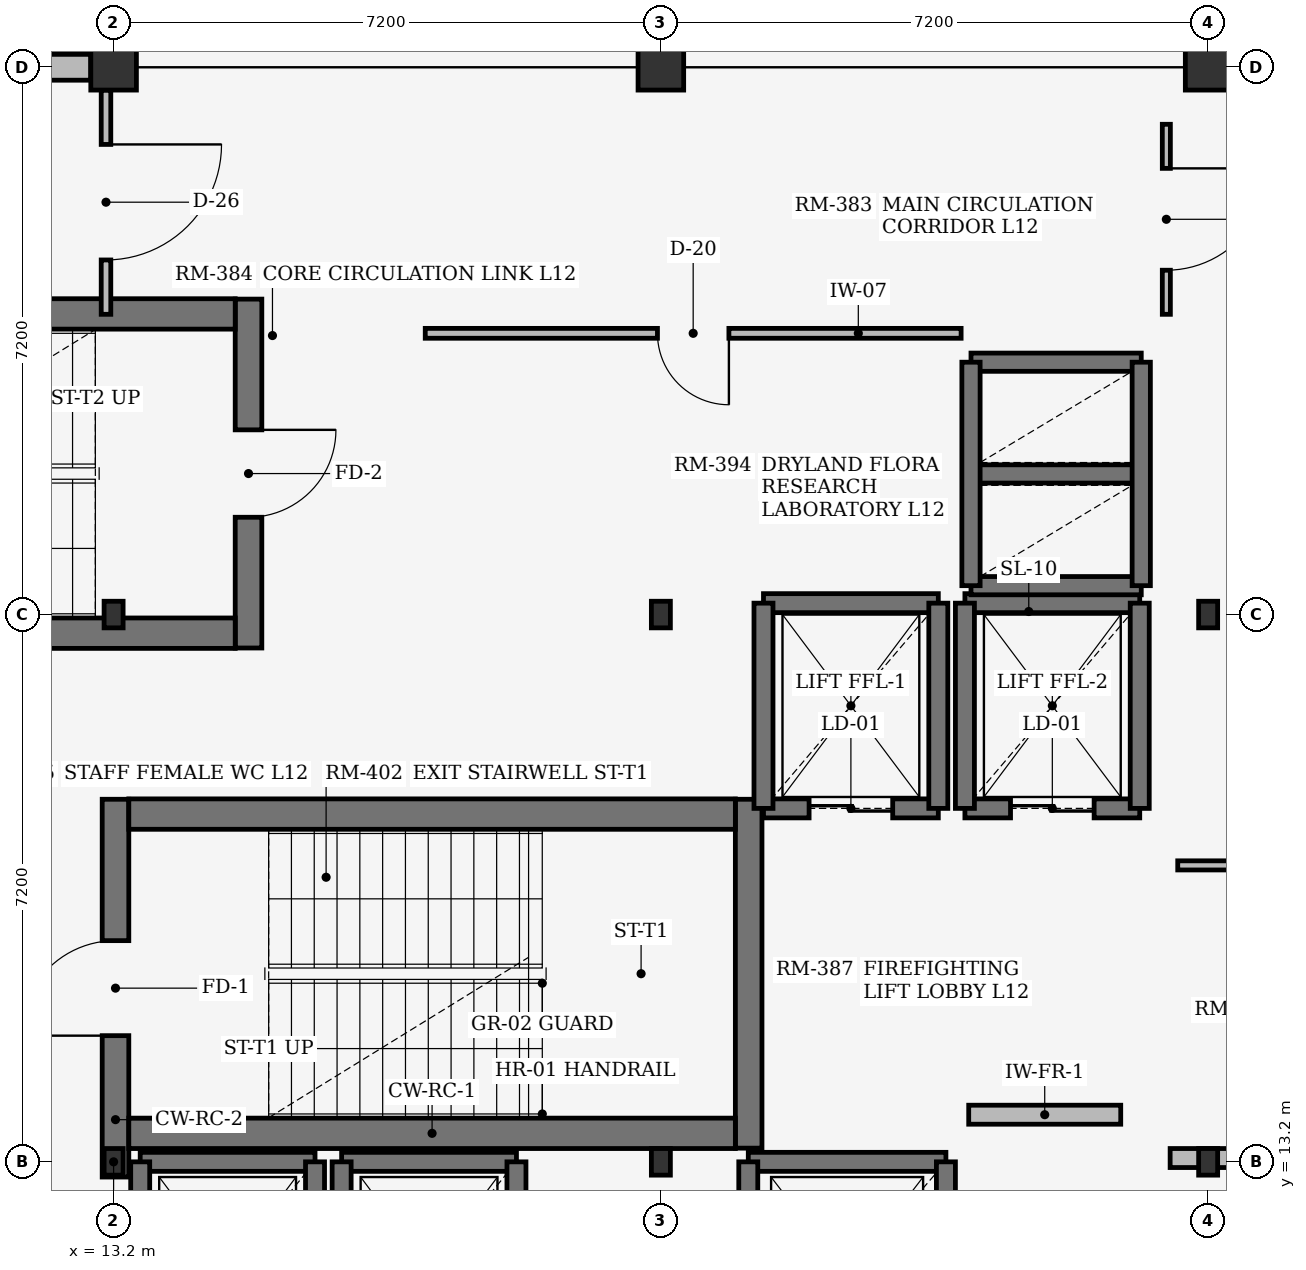
"""IFC4 building model, lengths in metres.
Left out: names, types, materials, properties, quantities, classifications, styles, units other than length and angle.
Written with IfcOpenShell. Run it as: python <this file> out.ifc"""

import sys

from ifc_helpers import new_model, si_unit, direction, frame, frame_2d, origin, origin_2d, place, context, subcontext, project, spatial, rectangle, i_section, extrude, element, fill, save


model = new_model("IFC4")
c1 = context("Model", 3, precision=1e-05, world=origin(), true_north=direction((0.0, 1.0)))
c2 = subcontext(c1, "Body", "Model", "MODEL_VIEW")
j1 = project(units=[si_unit("LENGTHUNIT", "METRE"), si_unit("PLANEANGLEUNIT", "RADIAN")], contexts=[c1])
p1 = place(None, origin())
s1 = spatial("IfcSite", under=j1, at=p1, CompositionType="ELEMENT")
p2 = place(p1, origin())
s2 = spatial("IfcBuilding", under=s1, at=p2, CompositionType="ELEMENT")
p3 = place(p2, frame((0.0, 0.0, 48.3)))
s3 = spatial("IfcBuildingStorey", under=s2, at=p3, CompositionType="ELEMENT", Elevation=48.3)
for number, where, z_axis, x_axis in (
    (1, (13.2, 13.2, 0.0), (0.0, 0.0, 1.0), (1.0, 0.0, 0.0)),
    (2, (13.2, 20.4, 0.0), (0.0, 0.0, 1.0), (1.0, 0.0, 0.0)),
):
    element("IfcColumn", number, at=place(p3, frame(where, z_axis=z_axis, x_axis=x_axis)), inside=s3, PredefinedType="COLUMN", context=c2, shape_type="SweptSolid", body=[
        extrude(i_section(OverallWidth=0.25, OverallDepth=0.35, WebThickness=0.01, FlangeThickness=0.012, at=origin_2d()), origin(), (0.0, 0.0, 1.0), 3.68),
    ])
p4 = place(p3, frame((13.2, 27.6, 0.0), z_axis=(0.0, 0.0, 1.0), x_axis=(1.0, 0.0, 0.0)))
e3 = element("IfcColumn", 3, at=p4, inside=s3, PredefinedType="COLUMN", context=c2, shape_type="SweptSolid", body=[
    extrude(rectangle(XDim=0.6, YDim=0.6, at=origin_2d()), origin(), (0.0, 0.0, 1.0), 3.68),
])
for number, where, z_axis, x_axis in (
    (4, (20.4, 13.2, 0.0), (0.0, 0.0, 1.0), (1.0, 0.0, 0.0)),
    (5, (20.4, 20.4, 0.0), (0.0, 0.0, 1.0), (1.0, 0.0, 0.0)),
):
    element("IfcColumn", number, at=place(p3, frame(where, z_axis=z_axis, x_axis=x_axis)), inside=s3, PredefinedType="COLUMN", context=c2, shape_type="SweptSolid", body=[
        extrude(i_section(OverallWidth=0.25, OverallDepth=0.35, WebThickness=0.01, FlangeThickness=0.012, at=origin_2d()), origin(), (0.0, 0.0, 1.0), 3.68),
    ])
p5 = place(p3, frame((20.4, 27.6, 0.0), z_axis=(0.0, 0.0, 1.0), x_axis=(1.0, 0.0, 0.0)))
e6 = element("IfcColumn", 6, at=p5, inside=s3, PredefinedType="COLUMN", context=c2, shape_type="SweptSolid", body=[
    extrude(rectangle(XDim=0.6, YDim=0.6, at=origin_2d()), origin(), (0.0, 0.0, 1.0), 3.68),
])
for number, where, z_axis, x_axis in (
    (7, (27.6, 13.2, 0.0), (0.0, 0.0, 1.0), (1.0, 0.0, 0.0)),
    (8, (27.6, 20.4, 0.0), (0.0, 0.0, 1.0), (1.0, 0.0, 0.0)),
):
    element("IfcColumn", number, at=place(p3, frame(where, z_axis=z_axis, x_axis=x_axis)), inside=s3, PredefinedType="COLUMN", context=c2, shape_type="SweptSolid", body=[
        extrude(i_section(OverallWidth=0.25, OverallDepth=0.35, WebThickness=0.01, FlangeThickness=0.012, at=origin_2d()), origin(), (0.0, 0.0, 1.0), 3.68),
    ])
p6 = place(p3, frame((27.6, 27.6, 0.0), z_axis=(0.0, 0.0, 1.0), x_axis=(1.0, 0.0, 0.0)))
e9 = element("IfcColumn", 9, at=p6, inside=s3, PredefinedType="COLUMN", context=c2, shape_type="SweptSolid", body=[
    extrude(rectangle(XDim=0.6, YDim=0.6, at=origin_2d()), origin(), (0.0, 0.0, 1.0), 3.68),
])
p7 = place(p3, frame((6.3, 27.6, 0.0), z_axis=(0.0, 0.0, 1.0), x_axis=(1.0, 0.0, 0.0)))
e10 = element("IfcWall", 10, at=p7, inside=s3, PredefinedType="STANDARD", context=c2, shape_type="SweptSolid", body=[
    extrude(rectangle(XDim=6.6, YDim=0.34, at=frame_2d((3.3, 0.0))), origin(), (0.0, 0.0, 1.0), 3.26),
])
p8 = place(p7, frame((2.45, 0.0, 0.75)))
e11 = element("IfcOpeningElement", 11, at=p8, cuts=e10, PredefinedType="OPENING", context=c2, shape_type="SweptSolid", body=[
    extrude(rectangle(XDim=1.7, YDim=1.35, at=frame_2d((0.85, 0.675))), frame((0.0, 0.18, 0.0), z_axis=(0.0, -1.0, 0.0), x_axis=(1.0, 0.0, 0.0)), (0.0, 0.0, 1.0), 0.36),
])
p9 = place(p3, frame((13.225, 13.0, 0.0), z_axis=(0.0, 0.0, 1.0), x_axis=(0.0, 1.0, 0.0)))
e12 = element("IfcWall", 12, at=p9, inside=s3, PredefinedType="SHEAR", context=c2, shape_type="SweptSolid", body=[
    extrude(rectangle(XDim=4.97, YDim=0.35, at=frame_2d((2.485, 0.0))), origin(), (0.0, 0.0, 1.0), 3.68),
])
p10 = place(p9, frame((1.86, 0.0, 0.0)))
e13 = element("IfcOpeningElement", 13, at=p10, cuts=e12, PredefinedType="OPENING", context=c2, shape_type="SweptSolid", body=[
    extrude(rectangle(XDim=1.25, YDim=2.2, at=frame_2d((0.625, 1.1))), frame((0.0, 0.185, 0.0), z_axis=(0.0, -1.0, 0.0), x_axis=(1.0, 0.0, 0.0)), (0.0, 0.0, 1.0), 0.37),
])
p11 = place(p3, frame((21.555, 13.38, 0.0), z_axis=(0.0, 0.0, 1.0), x_axis=(0.0, 1.0, 0.0)))
e14 = element("IfcWall", 14, at=p11, inside=s3, PredefinedType="SHEAR", context=c2, shape_type="SweptSolid", body=[
    extrude(rectangle(XDim=4.59, YDim=0.35, at=frame_2d((2.295, 0.0))), origin(), (0.0, 0.0, 1.0), 3.68),
])
for number, where, z_axis, x_axis in (
    (15, (13.4, 13.575, 0.0), (0.0, 0.0, 1.0), (1.0, 0.0, 0.0)),
    (16, (13.4, 17.775, 0.0), (0.0, 0.0, 1.0), (1.0, 0.0, 0.0)),
):
    element("IfcWall", number, at=place(p3, frame(where, z_axis=z_axis, x_axis=x_axis)), inside=s3, PredefinedType="SHEAR", context=c2, shape_type="SweptSolid", body=[
        extrude(rectangle(XDim=7.98, YDim=0.4, at=frame_2d((3.99, 0.0))), origin(), (0.0, 0.0, 1.0), 3.68),
    ])
p12 = place(p3, frame((14.975, 24.55, 0.0), z_axis=(0.0, 0.0, 1.0), x_axis=(0.0, -1.0, 0.0)))
e17 = element("IfcWall", 17, at=p12, inside=s3, PredefinedType="SHEAR", context=c2, shape_type="SweptSolid", body=[
    extrude(rectangle(XDim=4.59, YDim=0.35, at=frame_2d((2.295, 0.0))), origin(), (0.0, 0.0, 1.0), 3.68),
])
p13 = place(p12, frame((1.72, 0.0, 0.0)))
e18 = element("IfcOpeningElement", 18, at=p13, cuts=e17, PredefinedType="OPENING", context=c2, shape_type="SweptSolid", body=[
    extrude(rectangle(XDim=1.15, YDim=2.2, at=frame_2d((0.575, 1.1))), frame((0.0, 0.185, 0.0), z_axis=(0.0, -1.0, 0.0), x_axis=(1.0, 0.0, 0.0)), (0.0, 0.0, 1.0), 0.37),
])
for number, where, z_axis, x_axis in (
    (19, (14.8, 24.355, 0.0), (0.0, 0.0, 1.0), (-1.0, 0.0, 0.0)),
    (20, (14.8, 20.155, 0.0), (0.0, 0.0, 1.0), (-1.0, 0.0, 0.0)),
):
    element("IfcWall", number, at=place(p3, frame(where, z_axis=z_axis, x_axis=x_axis)), inside=s3, PredefinedType="SHEAR", context=c2, shape_type="SweptSolid", body=[
        extrude(rectangle(XDim=7.98, YDim=0.4, at=frame_2d((3.99, 0.0))), origin(), (0.0, 0.0, 1.0), 3.68),
    ])
p14 = place(p3, frame((21.75, 17.85, 0.0), z_axis=(0.0, 0.0, 1.0), x_axis=(1.0, 0.0, 0.0)))
e21 = element("IfcWall", 21, at=p14, inside=s3, PredefinedType="SHEAR", context=c2, shape_type="SweptSolid", body=[
    extrude(rectangle(XDim=2.3, YDim=0.25, at=frame_2d((1.15, 0.0))), origin(), (0.0, 0.0, 1.0), 3.68),
])
p15 = place(p14, frame((0.6, 0.0, 0.0)))
e22 = element("IfcOpeningElement", 22, at=p15, cuts=e21, PredefinedType="OPENING", context=c2, shape_type="SweptSolid", body=[
    extrude(rectangle(XDim=1.1, YDim=2.2, at=frame_2d((0.55, 1.1))), frame((0.0, 0.135, 0.0), z_axis=(0.0, -1.0, 0.0), x_axis=(1.0, 0.0, 0.0)), (0.0, 0.0, 1.0), 0.27),
])
p16 = place(p3, frame((21.75, 20.55, 0.0), z_axis=(0.0, 0.0, 1.0), x_axis=(1.0, 0.0, 0.0)))
e23 = element("IfcWall", 23, at=p16, inside=s3, PredefinedType="SHEAR", context=c2, shape_type="SweptSolid", body=[
    extrude(rectangle(XDim=2.3, YDim=0.25, at=frame_2d((1.15, 0.0))), origin(), (0.0, 0.0, 1.0), 3.68),
])
for number, where, z_axis, x_axis in (
    (24, (21.75, 17.85, 0.0), (0.0, 0.0, 1.0), (0.0, 1.0, 0.0)),
    (25, (24.05, 17.85, 0.0), (0.0, 0.0, 1.0), (0.0, 1.0, 0.0)),
):
    element("IfcWall", number, at=place(p3, frame(where, z_axis=z_axis, x_axis=x_axis)), inside=s3, PredefinedType="SHEAR", context=c2, shape_type="SweptSolid", body=[
        extrude(rectangle(XDim=2.7, YDim=0.25, at=frame_2d((1.35, 0.0))), origin(), (0.0, 0.0, 1.0), 3.68),
    ])
p17 = place(p3, frame((24.4, 17.85, 0.0), z_axis=(0.0, 0.0, 1.0), x_axis=(1.0, 0.0, 0.0)))
e26 = element("IfcWall", 26, at=p17, inside=s3, PredefinedType="SHEAR", context=c2, shape_type="SweptSolid", body=[
    extrude(rectangle(XDim=2.3, YDim=0.25, at=frame_2d((1.15, 0.0))), origin(), (0.0, 0.0, 1.0), 3.68),
])
p18 = place(p17, frame((0.6, 0.0, 0.0)))
e27 = element("IfcOpeningElement", 27, at=p18, cuts=e26, PredefinedType="OPENING", context=c2, shape_type="SweptSolid", body=[
    extrude(rectangle(XDim=1.1, YDim=2.2, at=frame_2d((0.55, 1.1))), frame((0.0, 0.135, 0.0), z_axis=(0.0, -1.0, 0.0), x_axis=(1.0, 0.0, 0.0)), (0.0, 0.0, 1.0), 0.27),
])
p19 = place(p3, frame((24.4, 20.55, 0.0), z_axis=(0.0, 0.0, 1.0), x_axis=(1.0, 0.0, 0.0)))
e28 = element("IfcWall", 28, at=p19, inside=s3, PredefinedType="SHEAR", context=c2, shape_type="SweptSolid", body=[
    extrude(rectangle(XDim=2.3, YDim=0.25, at=frame_2d((1.15, 0.0))), origin(), (0.0, 0.0, 1.0), 3.68),
])
for number, where, z_axis, x_axis in (
    (29, (24.4, 17.85, 0.0), (0.0, 0.0, 1.0), (0.0, 1.0, 0.0)),
    (30, (26.7, 17.85, 0.0), (0.0, 0.0, 1.0), (0.0, 1.0, 0.0)),
):
    element("IfcWall", number, at=place(p3, frame(where, z_axis=z_axis, x_axis=x_axis)), inside=s3, PredefinedType="SHEAR", context=c2, shape_type="SweptSolid", body=[
        extrude(rectangle(XDim=2.7, YDim=0.25, at=frame_2d((1.35, 0.0))), origin(), (0.0, 0.0, 1.0), 3.68),
    ])
p20 = place(p3, frame((13.55, 13.2, 0.0), z_axis=(0.0, 0.0, 1.0), x_axis=(1.0, 0.0, 0.0)))
e31 = element("IfcWall", 31, at=p20, inside=s3, PredefinedType="SHEAR", context=c2, shape_type="SweptSolid", body=[
    extrude(rectangle(XDim=2.3, YDim=0.25, at=frame_2d((1.15, 0.0))), origin(), (0.0, 0.0, 1.0), 3.68),
])
for number, where, z_axis, x_axis in (
    (32, (13.55, 10.4, 0.0), (0.0, 0.0, 1.0), (0.0, 1.0, 0.0)),
    (33, (15.85, 10.4, 0.0), (0.0, 0.0, 1.0), (0.0, 1.0, 0.0)),
):
    element("IfcWall", number, at=place(p3, frame(where, z_axis=z_axis, x_axis=x_axis)), inside=s3, PredefinedType="SHEAR", context=c2, shape_type="SweptSolid", body=[
        extrude(rectangle(XDim=2.8, YDim=0.25, at=frame_2d((1.4, 0.0))), origin(), (0.0, 0.0, 1.0), 3.68),
    ])
p21 = place(p3, frame((16.2, 13.2, 0.0), z_axis=(0.0, 0.0, 1.0), x_axis=(1.0, 0.0, 0.0)))
e34 = element("IfcWall", 34, at=p21, inside=s3, PredefinedType="SHEAR", context=c2, shape_type="SweptSolid", body=[
    extrude(rectangle(XDim=2.3, YDim=0.25, at=frame_2d((1.15, 0.0))), origin(), (0.0, 0.0, 1.0), 3.68),
])
for number, where, z_axis, x_axis in (
    (35, (16.2, 10.4, 0.0), (0.0, 0.0, 1.0), (0.0, 1.0, 0.0)),
    (36, (18.5, 10.4, 0.0), (0.0, 0.0, 1.0), (0.0, 1.0, 0.0)),
):
    element("IfcWall", number, at=place(p3, frame(where, z_axis=z_axis, x_axis=x_axis)), inside=s3, PredefinedType="SHEAR", context=c2, shape_type="SweptSolid", body=[
        extrude(rectangle(XDim=2.8, YDim=0.25, at=frame_2d((1.4, 0.0))), origin(), (0.0, 0.0, 1.0), 3.68),
    ])
p22 = place(p3, frame((21.55, 13.2, 0.0), z_axis=(0.0, 0.0, 1.0), x_axis=(1.0, 0.0, 0.0)))
e37 = element("IfcWall", 37, at=p22, inside=s3, PredefinedType="SHEAR", context=c2, shape_type="SweptSolid", body=[
    extrude(rectangle(XDim=2.6, YDim=0.25, at=frame_2d((1.3, 0.0))), origin(), (0.0, 0.0, 1.0), 3.68),
])
for number, where, z_axis, x_axis in (
    (38, (21.55, 10.2, 0.0), (0.0, 0.0, 1.0), (0.0, 1.0, 0.0)),
    (39, (24.15, 10.2, 0.0), (0.0, 0.0, 1.0), (0.0, 1.0, 0.0)),
):
    element("IfcWall", number, at=place(p3, frame(where, z_axis=z_axis, x_axis=x_axis)), inside=s3, PredefinedType="SHEAR", context=c2, shape_type="SweptSolid", body=[
        extrude(rectangle(XDim=3.0, YDim=0.25, at=frame_2d((1.5, 0.0))), origin(), (0.0, 0.0, 1.0), 3.68),
    ])
for number, where, z_axis, x_axis in (
    (40, (24.48, 20.78, 0.0), (0.0, 0.0, 1.0), (1.0, 0.0, 0.0)),
    (41, (24.48, 22.25, 0.0), (0.0, 0.0, 1.0), (1.0, 0.0, 0.0)),
    (42, (24.48, 23.72, 0.0), (0.0, 0.0, 1.0), (1.0, 0.0, 0.0)),
):
    element("IfcWall", number, at=place(p3, frame(where, z_axis=z_axis, x_axis=x_axis)), inside=s3, PredefinedType="SHEAR", context=c2, shape_type="SweptSolid", body=[
        extrude(rectangle(XDim=2.24, YDim=0.24, at=frame_2d((1.12, 0.0))), origin(), (0.0, 0.0, 1.0), 3.68),
    ])
for number, where, z_axis, x_axis in (
    (43, (24.48, 20.78, 0.0), (0.0, 0.0, 1.0), (0.0, 1.0, 0.0)),
    (44, (26.72, 20.78, 0.0), (0.0, 0.0, 1.0), (0.0, 1.0, 0.0)),
):
    element("IfcWall", number, at=place(p3, frame(where, z_axis=z_axis, x_axis=x_axis)), inside=s3, PredefinedType="SHEAR", context=c2, shape_type="SweptSolid", body=[
        extrude(rectangle(XDim=2.94, YDim=0.24, at=frame_2d((1.47, 0.0))), origin(), (0.0, 0.0, 1.0), 3.68),
    ])
p23 = place(p3, frame((24.45, 13.82, 0.0), z_axis=(0.0, 0.0, 1.0), x_axis=(1.0, 0.0, 0.0)))
e45 = element("IfcWall", 45, at=p23, inside=s3, PredefinedType="SOLIDWALL", context=c2, shape_type="SweptSolid", body=[
    extrude(rectangle(XDim=2.0, YDim=0.25, at=frame_2d((1.0, 0.0))), origin(), (0.0, 0.0, 1.0), 3.66),
])
p24 = place(p3, frame((17.3, 24.1, 0.0), z_axis=(0.0, 0.0, 1.0), x_axis=(1.0, 0.0, 0.0)))
e46 = element("IfcWall", 46, at=p24, inside=s3, PredefinedType="PARTITIONING", context=c2, shape_type="SweptSolid", body=[
    extrude(rectangle(XDim=7.05, YDim=0.13, at=frame_2d((3.525, 0.0))), origin(), (0.0, 0.0, 1.0), 3.66),
])
p25 = place(p24, frame((3.055, 0.0, 0.0)))
e47 = element("IfcOpeningElement", 47, at=p25, cuts=e46, PredefinedType="OPENING", context=c2, shape_type="SweptSolid", body=[
    extrude(rectangle(XDim=0.94, YDim=2.18, at=frame_2d((0.47, 1.09))), frame((0.0, 0.075, 0.0), z_axis=(0.0, -1.0, 0.0), x_axis=(1.0, 0.0, 0.0)), (0.0, 0.0, 1.0), 0.15),
])
p26 = place(p3, frame((27.2, 17.1, 0.0), z_axis=(0.0, 0.0, 1.0), x_axis=(1.0, 0.0, 0.0)))
e48 = element("IfcWall", 48, at=p26, inside=s3, PredefinedType="PARTITIONING", context=c2, shape_type="SweptSolid", body=[
    extrude(rectangle(XDim=7.05, YDim=0.12, at=frame_2d((3.525, 0.0))), origin(), (0.0, 0.0, 1.0), 3.66),
])
p27 = place(p26, frame((3.015, 0.0, 0.0)))
e49 = element("IfcOpeningElement", 49, at=p27, cuts=e48, PredefinedType="OPENING", context=c2, shape_type="SweptSolid", body=[
    extrude(rectangle(XDim=1.02, YDim=2.18, at=frame_2d((0.51, 1.09))), frame((0.0, 0.07, 0.0), z_axis=(0.0, -1.0, 0.0), x_axis=(1.0, 0.0, 0.0)), (0.0, 0.0, 1.0), 0.14),
])
p28 = place(p3, frame((27.1, 13.25, 0.0), z_axis=(0.0, 0.0, 1.0), x_axis=(1.0, 0.0, 0.0)))
e50 = element("IfcWall", 50, at=p28, inside=s3, PredefinedType="SOLIDWALL", context=c2, shape_type="SweptSolid", body=[
    extrude(rectangle(XDim=3.7, YDim=0.25, at=frame_2d((1.85, 0.0))), origin(), (0.0, 0.0, 1.0), 3.27),
])
p29 = place(p28, frame((1.05, 0.0, 0.0)))
e51 = element("IfcOpeningElement", 51, at=p29, cuts=e50, PredefinedType="OPENING", context=c2, shape_type="SweptSolid", body=[
    extrude(rectangle(XDim=1.8, YDim=2.25, at=frame_2d((0.9, 1.125))), frame((0.0, 0.135, 0.0), z_axis=(0.0, -1.0, 0.0), x_axis=(1.0, 0.0, 0.0)), (0.0, 0.0, 1.0), 0.27),
])
p30 = place(p3, frame((27.05, 24.35, 0.0), z_axis=(0.0, 0.0, 1.0), x_axis=(0.0, 1.0, 0.0)))
e52 = element("IfcWall", 52, at=p30, inside=s3, PredefinedType="PARTITIONING", context=c2, shape_type="SweptSolid", body=[
    extrude(rectangle(XDim=2.5, YDim=0.106, at=frame_2d((1.25, 0.0))), origin(), (0.0, 0.0, 1.0), 3.66),
])
p31 = place(p30, frame((0.58, 0.0, 0.0)))
e53 = element("IfcOpeningElement", 53, at=p31, cuts=e52, PredefinedType="OPENING", context=c2, shape_type="SweptSolid", body=[
    extrude(rectangle(XDim=1.34, YDim=2.22, at=frame_2d((0.67, 1.11))), frame((0.0, 0.063, 0.0), z_axis=(0.0, -1.0, 0.0), x_axis=(1.0, 0.0, 0.0)), (0.0, 0.0, 1.0), 0.126),
])
p32 = place(p3, frame((13.1, 24.35, 0.0), z_axis=(0.0, 0.0, 1.0), x_axis=(0.0, 1.0, 0.0)))
e54 = element("IfcWall", 54, at=p32, inside=s3, PredefinedType="PARTITIONING", context=c2, shape_type="SweptSolid", body=[
    extrude(rectangle(XDim=2.95, YDim=0.126, at=frame_2d((1.475, 0.0))), origin(), (0.0, 0.0, 1.0), 3.27),
])
p33 = place(p32, frame((0.715, 0.0, 0.0)))
e55 = element("IfcOpeningElement", 55, at=p33, cuts=e54, PredefinedType="OPENING", context=c2, shape_type="SweptSolid", body=[
    extrude(rectangle(XDim=1.52, YDim=2.26, at=frame_2d((0.76, 1.13))), frame((0.0, 0.073, 0.0), z_axis=(0.0, -1.0, 0.0), x_axis=(1.0, 0.0, 0.0)), (0.0, 0.0, 1.0), 0.146),
])
p34 = place(p10, origin())
e56 = element("IfcDoor", 56, at=p34, inside=s3, OperationType="SINGLE_SWING_LEFT", PredefinedType="DOOR", context=c2, shape_type="SweptSolid", body=[
    extrude(rectangle(XDim=1.25, YDim=2.2, at=frame_2d((0.625, 1.1))), frame((0.0, 0.025, 0.0), z_axis=(0.0, -1.0, 0.0), x_axis=(1.0, 0.0, 0.0)), (0.0, 0.0, 1.0), 0.05),
])
fill(e13, e56)
p35 = place(p13, origin())
e57 = element("IfcDoor", 57, at=p35, inside=s3, OperationType="SINGLE_SWING_LEFT", PredefinedType="DOOR", context=c2, shape_type="SweptSolid", body=[
    extrude(rectangle(XDim=1.15, YDim=2.2, at=frame_2d((0.575, 1.1))), frame((0.0, 0.025, 0.0), z_axis=(0.0, -1.0, 0.0), x_axis=(1.0, 0.0, 0.0)), (0.0, 0.0, 1.0), 0.05),
])
fill(e18, e57)
p36 = place(p15, origin())
e58 = element("IfcDoor", 58, at=p36, inside=s3, OperationType="DOUBLE_DOOR_SLIDING", PredefinedType="DOOR", context=c2, shape_type="SweptSolid", body=[
    extrude(rectangle(XDim=1.1, YDim=2.2, at=frame_2d((0.55, 1.1))), frame((0.0, 0.025, 0.0), z_axis=(0.0, -1.0, 0.0), x_axis=(1.0, 0.0, 0.0)), (0.0, 0.0, 1.0), 0.05),
])
fill(e22, e58)
p37 = place(p18, origin())
e59 = element("IfcDoor", 59, at=p37, inside=s3, OperationType="DOUBLE_DOOR_SLIDING", PredefinedType="DOOR", context=c2, shape_type="SweptSolid", body=[
    extrude(rectangle(XDim=1.1, YDim=2.2, at=frame_2d((0.55, 1.1))), frame((0.0, 0.025, 0.0), z_axis=(0.0, -1.0, 0.0), x_axis=(1.0, 0.0, 0.0)), (0.0, 0.0, 1.0), 0.05),
])
fill(e27, e59)
p38 = place(p25, origin())
e60 = element("IfcDoor", 60, at=p38, inside=s3, OperationType="SINGLE_SWING_RIGHT", PredefinedType="DOOR", context=c2, shape_type="SweptSolid", body=[
    extrude(rectangle(XDim=0.94, YDim=2.18, at=frame_2d((0.47, 1.09))), frame((0.0, 0.025, 0.0), z_axis=(0.0, -1.0, 0.0), x_axis=(1.0, 0.0, 0.0)), (0.0, 0.0, 1.0), 0.05),
])
fill(e47, e60)
p39 = place(p31, origin())
e61 = element("IfcDoor", 61, at=p39, inside=s3, OperationType="SINGLE_SWING_RIGHT", PredefinedType="DOOR", context=c2, shape_type="SweptSolid", body=[
    extrude(rectangle(XDim=1.34, YDim=2.22, at=frame_2d((0.67, 1.11))), frame((0.0, 0.025, 0.0), z_axis=(0.0, -1.0, 0.0), x_axis=(1.0, 0.0, 0.0)), (0.0, 0.0, 1.0), 0.05),
])
fill(e53, e61)
p40 = place(p33, origin())
e62 = element("IfcDoor", 62, at=p40, inside=s3, OperationType="SINGLE_SWING_RIGHT", PredefinedType="DOOR", context=c2, shape_type="SweptSolid", body=[
    extrude(rectangle(XDim=1.52, YDim=2.26, at=frame_2d((0.76, 1.13))), frame((0.0, 0.025, 0.0), z_axis=(0.0, -1.0, 0.0), x_axis=(1.0, 0.0, 0.0)), (0.0, 0.0, 1.0), 0.05),
])
fill(e55, e62)
save(model, sys.argv[1])
